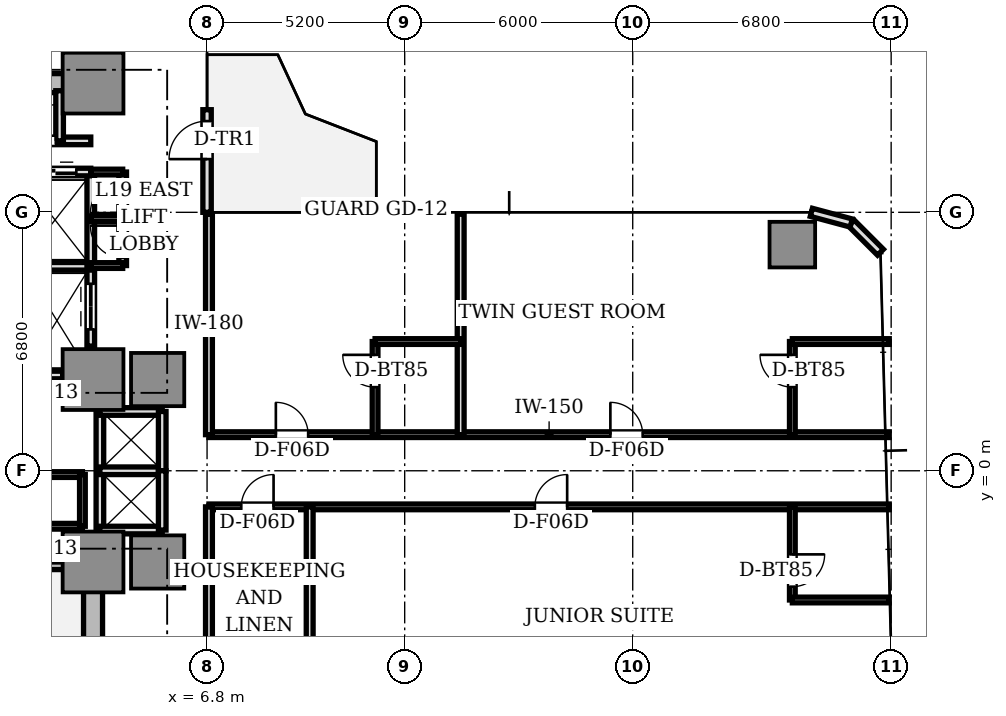
"""IFC4 building model, lengths in metres.
Left out: names, types, materials, properties, quantities, classifications, styles, units other than length and angle.
Written with IfcOpenShell. Run it as: python <this file> out.ifc"""

import sys

from ifc_helpers import new_model, si_unit, direction, frame, frame_2d, origin, origin_2d, place, context, subcontext, project, spatial, rectangle, extrude, source, transform, mapped, element, fill, save


model = new_model("IFC4")
c1 = context("Model", 3, precision=1e-05, world=origin(), true_north=direction((0.0, 1.0)))
c2 = subcontext(c1, "Body", "Model", "MODEL_VIEW")
j1 = project(units=[si_unit("LENGTHUNIT", "METRE"), si_unit("PLANEANGLEUNIT", "RADIAN")], contexts=[c1])
p1 = place(None, origin())
s1 = spatial("IfcSite", under=j1, at=p1, CompositionType="ELEMENT")
p2 = place(p1, origin())
s2 = spatial("IfcBuilding", under=s1, at=p2, CompositionType="ELEMENT")
p3 = place(p2, frame((0.0, 0.0, 71.15)))
s3 = spatial("IfcBuildingStorey", under=s2, at=p3, CompositionType="ELEMENT", Elevation=71.15)
p4 = place(p3, frame((-3.55, 10.2, 0.0), z_axis=(0.0, 0.0, 1.0), x_axis=(1.0, 0.0, 0.0)))
e1 = element("IfcWall", 1, at=p4, inside=s3, PredefinedType="SHEAR", context=c2, shape_type="SweptSolid", body=[
    extrude(rectangle(XDim=7.1, YDim=0.5, at=frame_2d((3.55, 0.0))), origin(), (0.0, 0.0, 1.0), 3.03),
])
p5 = place(p3, frame((3.8, -9.75, 0.0), z_axis=(0.0, 0.0, 1.0), x_axis=(0.0, 1.0, 0.0)))
e2 = element("IfcWall", 2, at=p5, inside=s3, PredefinedType="SHEAR", context=c2, shape_type="SweptSolid", body=[
    extrude(rectangle(XDim=6.9, YDim=0.5, at=frame_2d((3.45, 0.0))), origin(), (0.0, 0.0, 1.0), 3.03),
])
m1 = source(origin(), c2, "Body", "SweptSolid", [
    extrude(rectangle(XDim=1.6, YDim=1.6, at=origin_2d()), origin(), (0.0, 0.0, 1.0), 3.03),
])
for number, where, z_axis, x_axis in (
    (3, (3.8, 2.4, 0.0), (0.0, 0.0, 1.0), (1.0, 0.0, 0.0)),
    (4, (3.8, 10.2, 0.0), (0.0, 0.0, 1.0), (1.0, 0.0, 0.0)),
    (5, (3.8, -2.4, 0.0), (0.0, 0.0, 1.0), (1.0, 0.0, 0.0)),
):
    element("IfcColumn", number, at=place(p3, frame(where, z_axis=z_axis, x_axis=x_axis)), inside=s3, PredefinedType="COLUMN", context=c2, shape_type="MappedRepresentation", body=[
        mapped(m1, transform((0.0, 0.0, 0.0), scale=1.0)),
    ])
m2 = source(origin(), c2, "Body", "SweptSolid", [
    extrude(rectangle(XDim=1.4, YDim=1.4, at=origin_2d()), origin(), (0.0, 0.0, 1.0), 3.03),
])
for number, where, z_axis, x_axis in (
    (6, (5.5, 2.4, 0.0), (0.0, 0.0, 1.0), (1.0, 0.0, 0.0)),
    (7, (5.5, -2.4, 0.0), (0.0, 0.0, 1.0), (1.0, 0.0, 0.0)),
):
    element("IfcColumn", number, at=place(p3, frame(where, z_axis=z_axis, x_axis=x_axis)), inside=s3, PredefinedType="COLUMN", context=c2, shape_type="MappedRepresentation", body=[
        mapped(m2, transform((0.0, 0.0, 0.0), scale=1.0)),
    ])
m3 = source(origin(), c2, "Body", "SweptSolid", [
    extrude(rectangle(XDim=1.2, YDim=1.2, at=origin_2d()), origin(), (0.0, 0.0, 1.0), 3.03),
])
p6 = place(p3, frame((22.2, 5.95, 0.0), z_axis=(0.0, 0.0, 1.0), x_axis=(1.0, 0.0, 0.0)))
e8 = element("IfcColumn", 8, at=p6, inside=s3, PredefinedType="COLUMN", context=c2, shape_type="MappedRepresentation", body=[
    mapped(m3, transform((0.0, 0.0, 0.0), scale=1.0)),
])
for number, where, z_axis, x_axis in (
    (9, (24.519, 5.75, 0.0), (0.0, 0.0, 1.0), (-0.707, 0.707, 0.0)),
    (10, (23.75, 6.519, 0.0), (0.0, 0.0, 1.0), (-0.966, 0.259, 0.0)),
):
    element("IfcWall", number, at=place(p3, frame(where, z_axis=z_axis, x_axis=x_axis)), inside=s3, PredefinedType="STANDARD", context=c2, shape_type="SweptSolid", body=[
        extrude(rectangle(XDim=1.087, YDim=0.22, at=frame_2d((0.543, 0.0))), origin(), (0.0, 0.0, 1.0), 3.03),
    ])
p7 = place(p3, frame((6.8, 6.8, 0.0), z_axis=(0.0, 0.0, 1.0), x_axis=(0.0, 1.0, 0.0)))
e11 = element("IfcWall", 11, at=p7, inside=s3, PredefinedType="STANDARD", context=c2, shape_type="SweptSolid", body=[
    extrude(rectangle(XDim=2.7, YDim=0.22, at=frame_2d((1.35, 0.0))), origin(), (0.0, 0.0, 1.0), 3.03),
])
p8 = place(p7, frame((1.4, 0.0, 0.0)))
e12 = element("IfcOpeningElement", 12, at=p8, cuts=e11, PredefinedType="OPENING", context=c2, shape_type="SweptSolid", body=[
    extrude(rectangle(XDim=1.0, YDim=2.2, at=frame_2d((0.5, 1.1))), frame((0.0, 0.12, 0.0), z_axis=(0.0, -1.0, 0.0), x_axis=(1.0, 0.0, 0.0)), (0.0, 0.0, 1.0), 0.24),
])
p9 = place(p3, frame((0.0, -2.5, 0.0), z_axis=(0.0, 0.0, 1.0), x_axis=(1.0, 0.0, 0.0)))
e13 = element("IfcWall", 13, at=p9, inside=s3, PredefinedType="SOLIDWALL", context=c2, shape_type="SweptSolid", body=[
    extrude(rectangle(XDim=3.72, YDim=0.2, at=frame_2d((1.86, 0.0))), origin(), (0.0, 0.0, 1.0), 3.03),
])
p10 = place(p3, frame((2.0, 2.52, 0.0), z_axis=(0.0, 0.0, 1.0), x_axis=(1.0, 0.0, 0.0)))
e14 = element("IfcWall", 14, at=p10, inside=s3, PredefinedType="SOLIDWALL", context=c2, shape_type="SweptSolid", body=[
    extrude(rectangle(XDim=1.0, YDim=0.2, at=frame_2d((0.5, 0.0))), origin(), (0.0, 0.0, 1.0), 2.58),
])
p11 = place(p3, frame((3.74, 3.28, 0.0), z_axis=(0.0, 0.0, 1.0), x_axis=(0.0, 1.0, 0.0)))
e15 = element("IfcWall", 15, at=p11, inside=s3, PredefinedType="SOLIDWALL", context=c2, shape_type="SweptSolid", body=[
    extrude(rectangle(XDim=2.08, YDim=0.2, at=frame_2d((1.04, 0.0))), origin(), (0.0, 0.0, 1.0), 2.58),
])
p12 = place(p11, frame((0.44, 0.0, 0.0)))
e16 = element("IfcOpeningElement", 16, at=p12, cuts=e15, PredefinedType="OPENING", context=c2, shape_type="SweptSolid", body=[
    extrude(rectangle(XDim=1.2, YDim=2.2, at=frame_2d((0.6, 1.1))), frame((0.0, 0.11, 0.0), z_axis=(0.0, -1.0, 0.0), x_axis=(1.0, 0.0, 0.0)), (0.0, 0.0, 1.0), 0.22),
])
p13 = place(p3, frame((0.05, 5.38, 0.0), z_axis=(0.0, 0.0, 1.0), x_axis=(1.0, 0.0, 0.0)))
e17 = element("IfcWall", 17, at=p13, inside=s3, PredefinedType="SOLIDWALL", context=c2, shape_type="SweptSolid", body=[
    extrude(rectangle(XDim=3.69, YDim=0.2, at=frame_2d((1.845, 0.0))), origin(), (0.0, 0.0, 1.0), 2.58),
])
p14 = place(p3, frame((3.74, 5.38, 0.0), z_axis=(0.0, 0.0, 1.0), x_axis=(0.0, 1.0, 0.0)))
e18 = element("IfcWall", 18, at=p14, inside=s3, PredefinedType="SOLIDWALL", context=c2, shape_type="SweptSolid", body=[
    extrude(rectangle(XDim=2.48, YDim=0.2, at=frame_2d((1.24, 0.0))), origin(), (0.0, 0.0, 1.0), 2.58),
])
p15 = place(p3, frame((1.9, 7.86, 0.0), z_axis=(0.0, 0.0, 1.0), x_axis=(1.0, 0.0, 0.0)))
e19 = element("IfcWall", 19, at=p15, inside=s3, PredefinedType="SOLIDWALL", context=c2, shape_type="SweptSolid", body=[
    extrude(rectangle(XDim=1.84, YDim=0.2, at=frame_2d((0.92, 0.0))), origin(), (0.0, 0.0, 1.0), 2.58),
])
p16 = place(p15, frame((0.36, 0.0, 0.0)))
e20 = element("IfcOpeningElement", 20, at=p16, cuts=e19, PredefinedType="OPENING", context=c2, shape_type="SweptSolid", body=[
    extrude(rectangle(XDim=1.1, YDim=2.2, at=frame_2d((0.55, 1.1))), frame((0.0, 0.11, 0.0), z_axis=(0.0, -1.0, 0.0), x_axis=(1.0, 0.0, 0.0)), (0.0, 0.0, 1.0), 0.22),
])
p17 = place(p3, frame((3.98, -1.56, 0.0), z_axis=(0.0, 0.0, 1.0), x_axis=(0.0, 1.0, 0.0)))
e21 = element("IfcWall", 21, at=p17, inside=s3, PredefinedType="SOLIDWALL", context=c2, shape_type="SweptSolid", body=[
    extrude(rectangle(XDim=3.12, YDim=0.2, at=frame_2d((1.56, 0.0))), origin(), (0.0, 0.0, 1.0), 2.1),
])
for number, where, z_axis, x_axis in (
    (22, (3.98, 1.56, 0.0), (0.0, 0.0, 1.0), (1.0, 0.0, 0.0)),
    (23, (3.98, -1.56, 0.0), (0.0, 0.0, 1.0), (1.0, 0.0, 0.0)),
    (24, (3.98, 0.0, 0.0), (0.0, 0.0, 1.0), (1.0, 0.0, 0.0)),
):
    element("IfcWall", number, at=place(p3, frame(where, z_axis=z_axis, x_axis=x_axis)), inside=s3, PredefinedType="SOLIDWALL", context=c2, shape_type="SweptSolid", body=[
        extrude(rectangle(XDim=1.64, YDim=0.2, at=frame_2d((0.82, 0.0))), origin(), (0.0, 0.0, 1.0), 2.58),
    ])
for number, where, z_axis, x_axis in (
    (25, (5.62, 0.0, 0.0), (0.0, 0.0, 1.0), (0.0, 1.0, 0.0)),
    (26, (5.62, -1.56, 0.0), (0.0, 0.0, 1.0), (0.0, 1.0, 0.0)),
):
    element("IfcWall", number, at=place(p3, frame(where, z_axis=z_axis, x_axis=x_axis)), inside=s3, PredefinedType="SOLIDWALL", context=c2, shape_type="SweptSolid", body=[
        extrude(rectangle(XDim=1.56, YDim=0.2, at=frame_2d((0.78, 0.0))), origin(), (0.0, 0.0, 1.0), 2.58),
    ])
p18 = place(p3, frame((0.12, 8.68, 0.0), z_axis=(0.0, 0.0, 1.0), x_axis=(1.0, 0.0, 0.0)))
e27 = element("IfcWall", 27, at=p18, inside=s3, PredefinedType="SOLIDWALL", context=c2, shape_type="SweptSolid", body=[
    extrude(rectangle(XDim=3.62, YDim=0.2, at=frame_2d((1.81, 0.0))), origin(), (0.0, 0.0, 1.0), 2.58),
])
p19 = place(p18, frame((1.75, 0.0, 0.0)))
e28 = element("IfcOpeningElement", 28, at=p19, cuts=e27, PredefinedType="OPENING", context=c2, shape_type="SweptSolid", body=[
    extrude(rectangle(XDim=0.95, YDim=2.15, at=frame_2d((0.475, 1.075))), frame((0.0, 0.11, 0.0), z_axis=(0.0, -1.0, 0.0), x_axis=(1.0, 0.0, 0.0)), (0.0, 0.0, 1.0), 0.22),
])
p20 = place(p3, frame((2.92, 8.68, 0.0), z_axis=(0.0, 0.0, 1.0), x_axis=(0.0, 1.0, 0.0)))
e29 = element("IfcWall", 29, at=p20, inside=s3, PredefinedType="SOLIDWALL", context=c2, shape_type="SweptSolid", body=[
    extrude(rectangle(XDim=1.32, YDim=0.2, at=frame_2d((0.66, 0.0))), origin(), (0.0, 0.0, 1.0), 2.58),
])
p21 = place(p3, frame((4.58, 5.4, 0.0), z_axis=(0.0, 0.0, 1.0), x_axis=(0.0, 1.0, 0.0)))
e30 = element("IfcWall", 30, at=p21, inside=s3, PredefinedType="SOLIDWALL", context=c2, shape_type="SweptSolid", body=[
    extrude(rectangle(XDim=2.46, YDim=0.2, at=frame_2d((1.23, 0.0))), origin(), (0.0, 0.0, 1.0), 2.58),
])
p22 = place(p21, frame((0.2, 0.0, 0.0)))
e31 = element("IfcOpeningElement", 31, at=p22, cuts=e30, PredefinedType="OPENING", context=c2, shape_type="SweptSolid", body=[
    extrude(rectangle(XDim=0.85, YDim=2.1, at=frame_2d((0.425, 1.05))), frame((0.0, 0.11, 0.0), z_axis=(0.0, -1.0, 0.0), x_axis=(1.0, 0.0, 0.0)), (0.0, 0.0, 1.0), 0.22),
])
p23 = place(p21, frame((1.38, 0.0, 0.0)))
e32 = element("IfcOpeningElement", 32, at=p23, cuts=e30, PredefinedType="OPENING", context=c2, shape_type="SweptSolid", body=[
    extrude(rectangle(XDim=0.85, YDim=2.1, at=frame_2d((0.425, 1.05))), frame((0.0, 0.11, 0.0), z_axis=(0.0, -1.0, 0.0), x_axis=(1.0, 0.0, 0.0)), (0.0, 0.0, 1.0), 0.22),
])
for number, where, z_axis, x_axis in (
    (33, (3.74, 5.4, 0.0), (0.0, 0.0, 1.0), (1.0, 0.0, 0.0)),
    (34, (3.74, 7.86, 0.0), (0.0, 0.0, 1.0), (1.0, 0.0, 0.0)),
    (35, (3.74, 6.63, 0.0), (0.0, 0.0, 1.0), (1.0, 0.0, 0.0)),
):
    element("IfcWall", number, at=place(p3, frame(where, z_axis=z_axis, x_axis=x_axis)), inside=s3, PredefinedType="PARTITIONING", context=c2, shape_type="SweptSolid", body=[
        extrude(rectangle(XDim=0.84, YDim=0.15, at=frame_2d((0.42, 0.0))), origin(), (0.0, 0.0, 1.0), 2.58),
    ])
p24 = place(p3, frame((0.38, -0.1, 0.0), z_axis=(0.0, 0.0, 1.0), x_axis=(1.0, 0.0, 0.0)))
e36 = element("IfcWall", 36, at=p24, inside=s3, PredefinedType="PARTITIONING", context=c2, shape_type="SweptSolid", body=[
    extrude(rectangle(XDim=3.14, YDim=0.15, at=frame_2d((1.57, 0.0))), origin(), (0.0, 0.0, 1.0), 2.58),
])
p25 = place(p3, frame((0.38, -1.46, 0.0), z_axis=(0.0, 0.0, 1.0), x_axis=(1.0, 0.0, 0.0)))
e37 = element("IfcWall", 37, at=p25, inside=s3, PredefinedType="PARTITIONING", context=c2, shape_type="SweptSolid", body=[
    extrude(rectangle(XDim=3.14, YDim=0.15, at=frame_2d((1.57, 0.0))), origin(), (0.0, 0.0, 1.0), 2.58),
])
p26 = place(p25, frame((1.05, 0.0, 0.0)))
e38 = element("IfcOpeningElement", 38, at=p26, cuts=e37, PredefinedType="OPENING", context=c2, shape_type="SweptSolid", body=[
    extrude(rectangle(XDim=0.85, YDim=2.1, at=frame_2d((0.425, 1.05))), frame((0.0, 0.085, 0.0), z_axis=(0.0, -1.0, 0.0), x_axis=(1.0, 0.0, 0.0)), (0.0, 0.0, 1.0), 0.17),
])
p27 = place(p3, frame((3.52, -1.46, 0.0), z_axis=(0.0, 0.0, 1.0), x_axis=(0.0, 1.0, 0.0)))
e39 = element("IfcWall", 39, at=p27, inside=s3, PredefinedType="PARTITIONING", context=c2, shape_type="SweptSolid", body=[
    extrude(rectangle(XDim=1.36, YDim=0.15, at=frame_2d((0.68, 0.0))), origin(), (0.0, 0.0, 1.0), 2.1),
])
p28 = place(p3, frame((6.85, 0.95, 0.0), z_axis=(0.0, 0.0, 1.0), x_axis=(1.0, 0.0, 0.0)))
e40 = element("IfcWall", 40, at=p28, inside=s3, PredefinedType="PARTITIONING", context=c2, shape_type="SweptSolid", body=[
    extrude(rectangle(XDim=17.9, YDim=0.15, at=frame_2d((8.95, 0.0))), origin(), (0.0, 0.0, 1.0), 2.58),
])
p29 = place(p28, frame((1.76, 0.0, 0.0)))
e41 = element("IfcOpeningElement", 41, at=p29, cuts=e40, PredefinedType="OPENING", context=c2, shape_type="SweptSolid", body=[
    extrude(rectangle(XDim=0.85, YDim=2.1, at=frame_2d((0.425, 1.05))), frame((0.0, 0.085, 0.0), z_axis=(0.0, -1.0, 0.0), x_axis=(1.0, 0.0, 0.0)), (0.0, 0.0, 1.0), 0.17),
])
p30 = place(p28, frame((10.562, 0.0, 0.0)))
e42 = element("IfcOpeningElement", 42, at=p30, cuts=e40, PredefinedType="OPENING", context=c2, shape_type="SweptSolid", body=[
    extrude(rectangle(XDim=0.85, YDim=2.1, at=frame_2d((0.425, 1.05))), frame((0.0, 0.085, 0.0), z_axis=(0.0, -1.0, 0.0), x_axis=(1.0, 0.0, 0.0)), (0.0, 0.0, 1.0), 0.17),
])
p31 = place(p3, frame((6.85, -0.95, 0.0), z_axis=(0.0, 0.0, 1.0), x_axis=(1.0, 0.0, 0.0)))
e43 = element("IfcWall", 43, at=p31, inside=s3, PredefinedType="PARTITIONING", context=c2, shape_type="SweptSolid", body=[
    extrude(rectangle(XDim=17.9, YDim=0.15, at=frame_2d((8.95, 0.0))), origin(), (0.0, 0.0, 1.0), 2.58),
])
p32 = place(p31, frame((0.85, 0.0, 0.0)))
e44 = element("IfcOpeningElement", 44, at=p32, cuts=e43, PredefinedType="OPENING", context=c2, shape_type="SweptSolid", body=[
    extrude(rectangle(XDim=0.85, YDim=2.1, at=frame_2d((0.425, 1.05))), frame((0.0, 0.085, 0.0), z_axis=(0.0, -1.0, 0.0), x_axis=(1.0, 0.0, 0.0)), (0.0, 0.0, 1.0), 0.17),
])
p33 = place(p31, frame((8.575, 0.0, 0.0)))
e45 = element("IfcOpeningElement", 45, at=p33, cuts=e43, PredefinedType="OPENING", context=c2, shape_type="SweptSolid", body=[
    extrude(rectangle(XDim=0.85, YDim=2.1, at=frame_2d((0.425, 1.05))), frame((0.0, 0.085, 0.0), z_axis=(0.0, -1.0, 0.0), x_axis=(1.0, 0.0, 0.0)), (0.0, 0.0, 1.0), 0.17),
])
for number, where, z_axis, x_axis in (
    (46, (6.85, 0.95, 0.0), (0.0, 0.0, 1.0), (0.0, 1.0, 0.0)),
    (47, (6.85, -6.75, 0.0), (0.0, 0.0, 1.0), (0.0, 1.0, 0.0)),
    (48, (13.473, 0.95, 0.0), (0.0, 0.0, 1.0), (0.0, 1.0, 0.0)),
):
    element("IfcWall", number, at=place(p3, frame(where, z_axis=z_axis, x_axis=x_axis)), inside=s3, PredefinedType="PARTITIONING", context=c2, shape_type="SweptSolid", body=[
        extrude(rectangle(XDim=5.8, YDim=0.18, at=frame_2d((2.9, 0.0))), origin(), (0.0, 0.0, 1.0), 2.58),
    ])
p34 = place(p3, frame((11.221, 0.95, 0.0), z_axis=(0.0, 0.0, 1.0), x_axis=(0.0, 1.0, 0.0)))
e49 = element("IfcWall", 49, at=p34, inside=s3, PredefinedType="PARTITIONING", context=c2, shape_type="SweptSolid", body=[
    extrude(rectangle(XDim=2.45, YDim=0.15, at=frame_2d((1.225, 0.0))), origin(), (0.0, 0.0, 1.0), 2.58),
])
p35 = place(p34, frame((1.25, 0.0, 0.0)))
e50 = element("IfcOpeningElement", 50, at=p35, cuts=e49, PredefinedType="OPENING", context=c2, shape_type="SweptSolid", body=[
    extrude(rectangle(XDim=0.85, YDim=2.1, at=frame_2d((0.425, 1.05))), frame((0.0, 0.085, 0.0), z_axis=(0.0, -1.0, 0.0), x_axis=(1.0, 0.0, 0.0)), (0.0, 0.0, 1.0), 0.17),
])
p36 = place(p3, frame((11.221, 3.4, 0.0), z_axis=(0.0, 0.0, 1.0), x_axis=(1.0, 0.0, 0.0)))
e51 = element("IfcWall", 51, at=p36, inside=s3, PredefinedType="PARTITIONING", context=c2, shape_type="SweptSolid", body=[
    extrude(rectangle(XDim=2.252, YDim=0.15, at=frame_2d((1.126, 0.0))), origin(), (0.0, 0.0, 1.0), 2.55),
])
p37 = place(p3, frame((22.2, 0.95, 0.0), z_axis=(0.0, 0.0, 1.0), x_axis=(0.0, 1.0, 0.0)))
e52 = element("IfcWall", 52, at=p37, inside=s3, PredefinedType="PARTITIONING", context=c2, shape_type="SweptSolid", body=[
    extrude(rectangle(XDim=2.45, YDim=0.15, at=frame_2d((1.225, 0.0))), origin(), (0.0, 0.0, 1.0), 2.5),
])
p38 = place(p37, frame((1.25, 0.0, 0.0)))
e53 = element("IfcOpeningElement", 53, at=p38, cuts=e52, PredefinedType="OPENING", context=c2, shape_type="SweptSolid", body=[
    extrude(rectangle(XDim=0.85, YDim=2.1, at=frame_2d((0.425, 1.05))), frame((0.0, 0.085, 0.0), z_axis=(0.0, -1.0, 0.0), x_axis=(1.0, 0.0, 0.0)), (0.0, 0.0, 1.0), 0.17),
])
p39 = place(p3, frame((22.2, 3.4, 0.0), z_axis=(0.0, 0.0, 1.0), x_axis=(1.0, 0.0, 0.0)))
e54 = element("IfcWall", 54, at=p39, inside=s3, PredefinedType="PARTITIONING", context=c2, shape_type="SweptSolid", body=[
    extrude(rectangle(XDim=2.55, YDim=0.15, at=frame_2d((1.275, 0.0))), origin(), (0.0, 0.0, 1.0), 2.58),
])
p40 = place(p3, frame((9.5, -0.95, 0.0), z_axis=(0.0, 0.0, 1.0), x_axis=(0.0, -1.0, 0.0)))
e55 = element("IfcWall", 55, at=p40, inside=s3, PredefinedType="PARTITIONING", context=c2, shape_type="SweptSolid", body=[
    extrude(rectangle(XDim=5.8, YDim=0.18, at=frame_2d((2.9, 0.0))), origin(), (0.0, 0.0, 1.0), 2.58),
])
p41 = place(p3, frame((22.2, -0.95, 0.0), z_axis=(0.0, 0.0, 1.0), x_axis=(0.0, -1.0, 0.0)))
e56 = element("IfcWall", 56, at=p41, inside=s3, PredefinedType="PARTITIONING", context=c2, shape_type="SweptSolid", body=[
    extrude(rectangle(XDim=2.45, YDim=0.15, at=frame_2d((1.225, 0.0))), origin(), (0.0, 0.0, 1.0), 2.5),
])
p42 = place(p41, frame((1.25, 0.0, 0.0)))
e57 = element("IfcOpeningElement", 57, at=p42, cuts=e56, PredefinedType="OPENING", context=c2, shape_type="SweptSolid", body=[
    extrude(rectangle(XDim=0.85, YDim=2.1, at=frame_2d((0.425, 1.05))), frame((0.0, 0.085, 0.0), z_axis=(0.0, -1.0, 0.0), x_axis=(1.0, 0.0, 0.0)), (0.0, 0.0, 1.0), 0.17),
])
p43 = place(p3, frame((22.2, -3.4, 0.0), z_axis=(0.0, 0.0, 1.0), x_axis=(1.0, 0.0, 0.0)))
e58 = element("IfcWall", 58, at=p43, inside=s3, PredefinedType="PARTITIONING", context=c2, shape_type="SweptSolid", body=[
    extrude(rectangle(XDim=2.55, YDim=0.15, at=frame_2d((1.275, 0.0))), origin(), (0.0, 0.0, 1.0), 2.58),
])
m4 = source(origin(), c2, "Body", "SweptSolid", [
    extrude(rectangle(XDim=1.0, YDim=0.05, at=origin_2d()), origin(), (0.0, 0.0, 1.0), 2.2),
])
p44 = place(p8, frame((0.5, 0.0, 0.0)))
e59 = element("IfcDoor", 59, at=p44, inside=s3, OperationType="SINGLE_SWING_LEFT", PredefinedType="DOOR", context=c2, shape_type="MappedRepresentation", body=[
    mapped(m4, transform((0.0, 0.0, 0.0), scale=1.0)),
])
fill(e12, e59)
m5 = source(origin(), c2, "Body", "SweptSolid", [
    extrude(rectangle(XDim=1.2, YDim=0.05, at=origin_2d()), origin(), (0.0, 0.0, 1.0), 2.2),
])
p45 = place(p12, frame((0.6, 0.0, 0.0)))
e60 = element("IfcDoor", 60, at=p45, inside=s3, OperationType="DOUBLE_DOOR_SLIDING", PredefinedType="DOOR", context=c2, shape_type="MappedRepresentation", body=[
    mapped(m5, transform((0.0, 0.0, 0.0), scale=1.0)),
])
fill(e16, e60)
m6 = source(origin(), c2, "Body", "SweptSolid", [
    extrude(rectangle(XDim=1.1, YDim=0.05, at=origin_2d()), origin(), (0.0, 0.0, 1.0), 2.2),
])
p46 = place(p16, frame((0.55, 0.0, 0.0)))
e61 = element("IfcDoor", 61, at=p46, inside=s3, OperationType="DOUBLE_DOOR_SLIDING", PredefinedType="DOOR", context=c2, shape_type="MappedRepresentation", body=[
    mapped(m6, transform((0.0, 0.0, 0.0), scale=1.0)),
])
fill(e20, e61)
m7 = source(origin(), c2, "Body", "SweptSolid", [
    extrude(rectangle(XDim=0.95, YDim=0.05, at=origin_2d()), origin(), (0.0, 0.0, 1.0), 2.15),
])
p47 = place(p19, frame((0.475, 0.0, 0.0)))
e62 = element("IfcDoor", 62, at=p47, inside=s3, OperationType="SINGLE_SWING_RIGHT", PredefinedType="DOOR", context=c2, shape_type="MappedRepresentation", body=[
    mapped(m7, transform((0.0, 0.0, 0.0), scale=1.0)),
])
fill(e28, e62)
m8 = source(origin(), c2, "Body", "SweptSolid", [
    extrude(rectangle(XDim=0.85, YDim=0.05, at=origin_2d()), origin(), (0.0, 0.0, 1.0), 2.1),
])
p48 = place(p22, frame((0.425, 0.0, 0.0)))
e63 = element("IfcDoor", 63, at=p48, inside=s3, OperationType="SINGLE_SWING_RIGHT", PredefinedType="DOOR", context=c2, shape_type="MappedRepresentation", body=[
    mapped(m8, transform((0.0, 0.0, 0.0), scale=1.0)),
])
fill(e31, e63)
p49 = place(p23, frame((0.425, 0.0, 0.0)))
e64 = element("IfcDoor", 64, at=p49, inside=s3, OperationType="SINGLE_SWING_LEFT", PredefinedType="DOOR", context=c2, shape_type="MappedRepresentation", body=[
    mapped(m8, transform((0.0, 0.0, 0.0), scale=1.0)),
])
fill(e32, e64)
p50 = place(p35, frame((0.425, 0.0, 0.0)))
e65 = element("IfcDoor", 65, at=p50, inside=s3, OperationType="SINGLE_SWING_RIGHT", PredefinedType="DOOR", context=c2, shape_type="MappedRepresentation", body=[
    mapped(m8, transform((0.0, 0.0, 0.0), scale=1.0)),
])
fill(e50, e65)
p51 = place(p29, frame((0.425, 0.0, 0.0)))
e66 = element("IfcDoor", 66, at=p51, inside=s3, OperationType="SINGLE_SWING_LEFT", PredefinedType="DOOR", context=c2, shape_type="MappedRepresentation", body=[
    mapped(m8, transform((0.0, 0.0, 0.0), scale=1.0)),
])
fill(e41, e66)
p52 = place(p38, frame((0.425, 0.0, 0.0)))
e67 = element("IfcDoor", 67, at=p52, inside=s3, OperationType="SINGLE_SWING_RIGHT", PredefinedType="DOOR", context=c2, shape_type="MappedRepresentation", body=[
    mapped(m8, transform((0.0, 0.0, 0.0), scale=1.0)),
])
fill(e53, e67)
p53 = place(p30, frame((0.425, 0.0, 0.0)))
e68 = element("IfcDoor", 68, at=p53, inside=s3, OperationType="SINGLE_SWING_LEFT", PredefinedType="DOOR", context=c2, shape_type="MappedRepresentation", body=[
    mapped(m8, transform((0.0, 0.0, 0.0), scale=1.0)),
])
fill(e42, e68)
p54 = place(p32, frame((0.425, 0.0, 0.0)))
e69 = element("IfcDoor", 69, at=p54, inside=s3, OperationType="SINGLE_SWING_RIGHT", PredefinedType="DOOR", context=c2, shape_type="MappedRepresentation", body=[
    mapped(m8, transform((0.0, 0.0, 0.0), scale=1.0)),
])
fill(e44, e69)
p55 = place(p42, frame((0.425, 0.0, 0.0)))
e70 = element("IfcDoor", 70, at=p55, inside=s3, OperationType="SINGLE_SWING_LEFT", PredefinedType="DOOR", context=c2, shape_type="MappedRepresentation", body=[
    mapped(m8, transform((0.0, 0.0, 0.0), scale=1.0)),
])
fill(e57, e70)
p56 = place(p33, frame((0.425, 0.0, 0.0)))
e71 = element("IfcDoor", 71, at=p56, inside=s3, OperationType="SINGLE_SWING_RIGHT", PredefinedType="DOOR", context=c2, shape_type="MappedRepresentation", body=[
    mapped(m8, transform((0.0, 0.0, 0.0), scale=1.0)),
])
fill(e45, e71)
save(model, sys.argv[1])
